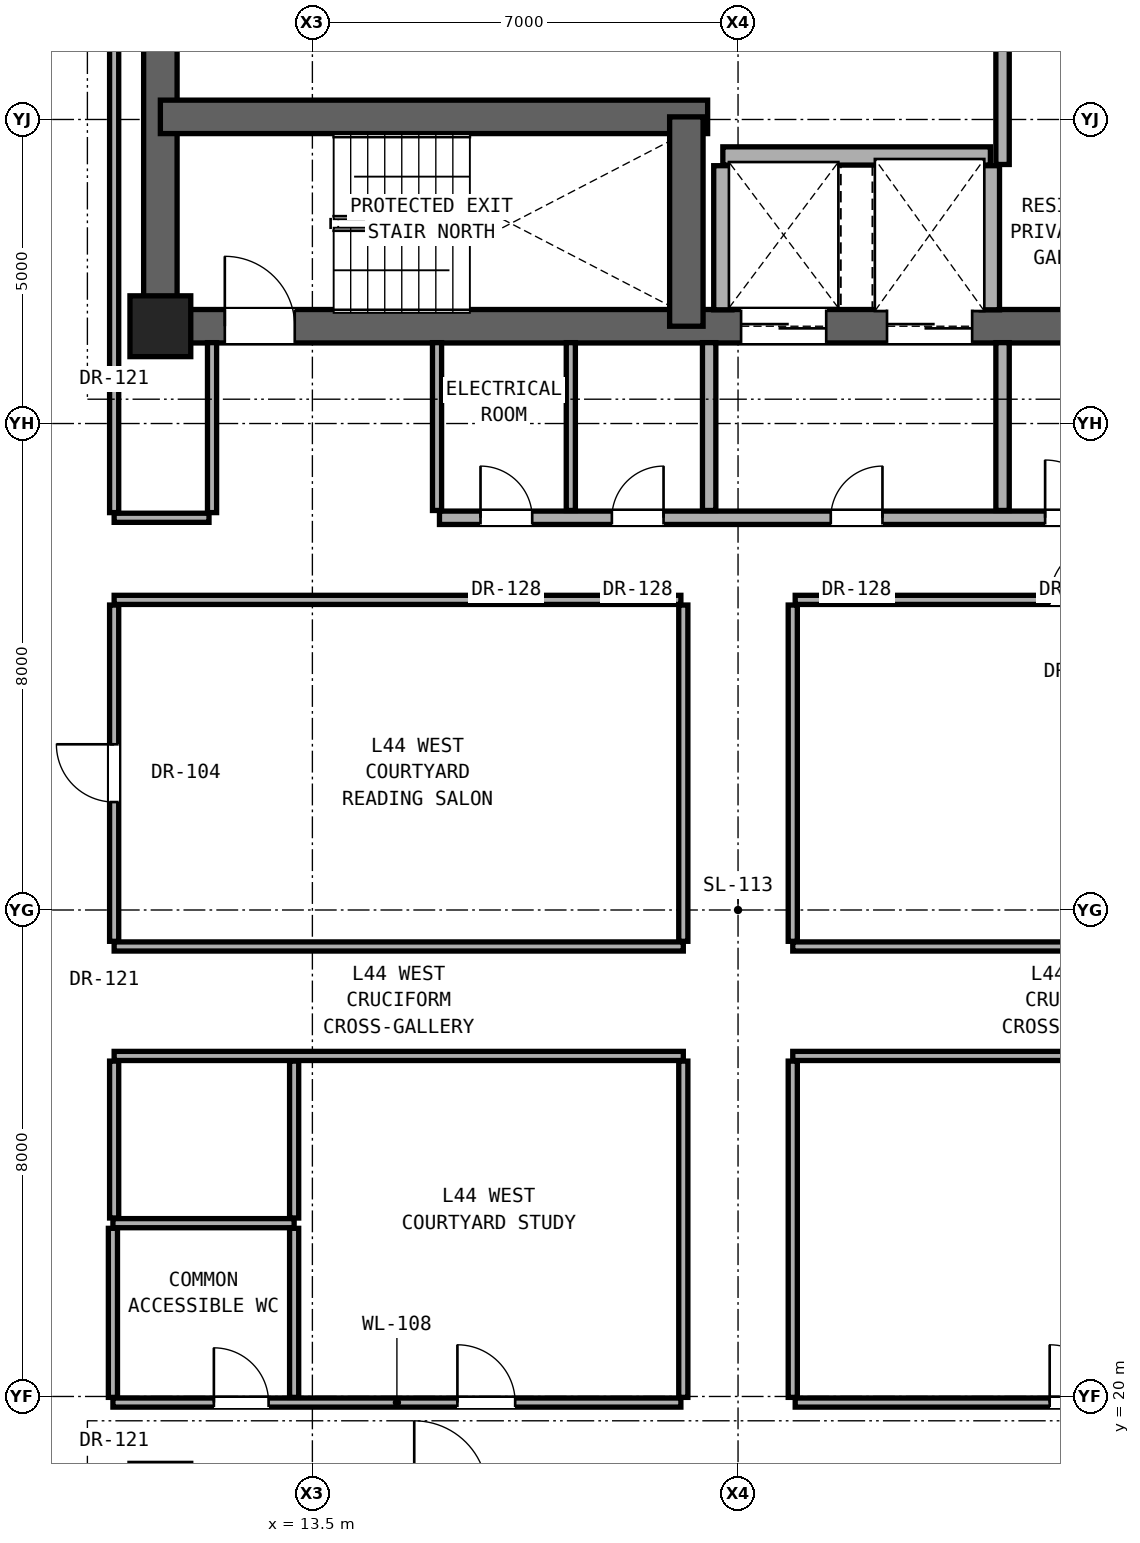
"""IFC4 building model, lengths in metres.
Left out: names, types, materials, properties, quantities, classifications, styles, units other than length and angle.
Written with IfcOpenShell. Run it as: python <this file> out.ifc"""

import sys

from ifc_helpers import new_model, si_unit, direction, frame, frame_2d, origin, origin_2d, place, context, subcontext, project, spatial, rectangle, extrude, element, fill, save


model = new_model("IFC4")
c1 = context("Model", 3, precision=1e-05, world=origin(), true_north=direction((0.0, 1.0)))
c2 = subcontext(c1, "Body", "Model", "MODEL_VIEW")
j1 = project(units=[si_unit("LENGTHUNIT", "METRE"), si_unit("PLANEANGLEUNIT", "RADIAN")], contexts=[c1])
p1 = place(None, origin())
s1 = spatial("IfcSite", under=j1, at=p1, CompositionType="ELEMENT")
p2 = place(p1, origin())
s2 = spatial("IfcBuilding", under=s1, at=p2, CompositionType="ELEMENT")
p3 = place(p2, frame((0.0, 0.0, 157.65)))
s3 = spatial("IfcBuildingStorey", under=s2, at=p3, CompositionType="ELEMENT", Elevation=157.65)
p4 = place(p3, frame((11.0, 37.6, 0.0), z_axis=(0.0, 0.0, 1.0), x_axis=(1.0, 0.0, 0.0)))
e1 = element("IfcColumn", 1, at=p4, inside=s3, PredefinedType="COLUMN", context=c2, shape_type="SweptSolid", body=[
    extrude(rectangle(XDim=1.0, YDim=1.0, at=origin_2d()), origin(), (0.0, 0.0, 1.0), 3.25),
])
p5 = place(p3, frame((11.0, 37.6, 0.0), z_axis=(0.0, 0.0, 1.0), x_axis=(0.0, 1.0, 0.0)))
e2 = element("IfcWall", 2, at=p5, inside=s3, PredefinedType="SHEAR", context=c2, shape_type="SweptSolid", body=[
    extrude(rectangle(XDim=6.0, YDim=0.55, at=frame_2d((3.0, 0.0))), origin(), (0.0, 0.0, 1.0), 3.05),
])
p6 = place(p3, frame((11.0, 37.6, 0.0), z_axis=(0.0, 0.0, 1.0), x_axis=(1.0, 0.0, 0.0)))
e3 = element("IfcWall", 3, at=p6, inside=s3, PredefinedType="SHEAR", context=c2, shape_type="SweptSolid", body=[
    extrude(rectangle(XDim=19.0, YDim=0.55, at=frame_2d((9.5, 0.0))), origin(), (0.0, 0.0, 1.0), 3.05),
])
p7 = place(p6, frame((1.06, 0.0, 0.0)))
e4 = element("IfcOpeningElement", 4, at=p7, cuts=e3, PredefinedType="OPENING", context=c2, shape_type="SweptSolid", body=[
    extrude(rectangle(XDim=1.15, YDim=2.2, at=frame_2d((0.575, 1.1))), frame((0.0, 0.285, 0.0), z_axis=(0.0, -1.0, 0.0), x_axis=(1.0, 0.0, 0.0)), (0.0, 0.0, 1.0), 0.57),
])
p8 = place(p6, frame((9.55, 0.0, 0.0)))
e5 = element("IfcOpeningElement", 5, at=p8, cuts=e3, PredefinedType="OPENING", context=c2, shape_type="SweptSolid", body=[
    extrude(rectangle(XDim=1.4, YDim=2.35, at=frame_2d((0.7, 1.175))), frame((0.0, 0.285, 0.0), z_axis=(0.0, -1.0, 0.0), x_axis=(1.0, 0.0, 0.0)), (0.0, 0.0, 1.0), 0.57),
])
p9 = place(p6, frame((11.95, 0.0, 0.0)))
e6 = element("IfcOpeningElement", 6, at=p9, cuts=e3, PredefinedType="OPENING", context=c2, shape_type="SweptSolid", body=[
    extrude(rectangle(XDim=1.4, YDim=2.35, at=frame_2d((0.7, 1.175))), frame((0.0, 0.285, 0.0), z_axis=(0.0, -1.0, 0.0), x_axis=(1.0, 0.0, 0.0)), (0.0, 0.0, 1.0), 0.57),
])
p10 = place(p3, frame((11.0, 41.043, 0.0), z_axis=(0.0, 0.0, 1.0), x_axis=(1.0, 0.0, 0.0)))
e7 = element("IfcWall", 7, at=p10, inside=s3, PredefinedType="SHEAR", context=c2, shape_type="SweptSolid", body=[
    extrude(rectangle(XDim=9.0, YDim=0.55, at=frame_2d((4.5, 0.0))), origin(), (0.0, 0.0, 1.0), 3.05),
])
p11 = place(p3, frame((19.65, 37.6, 0.0), z_axis=(0.0, 0.0, 1.0), x_axis=(0.0, 1.0, 0.0)))
e8 = element("IfcWall", 8, at=p11, inside=s3, PredefinedType="SHEAR", context=c2, shape_type="SweptSolid", body=[
    extrude(rectangle(XDim=3.443, YDim=0.55, at=frame_2d((1.721, 0.0))), origin(), (0.0, 0.0, 1.0), 3.05),
])
p12 = place(p3, frame((10.22, 19.9, 0.0), z_axis=(0.0, 0.0, 1.0), x_axis=(1.0, 0.0, 0.0)))
e9 = element("IfcWall", 9, at=p12, inside=s3, PredefinedType="PARTITIONING", context=c2, shape_type="SweptSolid", body=[
    extrude(rectangle(XDim=9.34, YDim=0.15, at=frame_2d((4.67, 0.0))), origin(), (0.0, 0.0, 1.0), 2.186),
])
p13 = place(p12, frame((1.66, 0.0, 0.0)))
e10 = element("IfcOpeningElement", 10, at=p13, cuts=e9, PredefinedType="OPENING", context=c2, shape_type="SweptSolid", body=[
    extrude(rectangle(XDim=0.9, YDim=2.1, at=frame_2d((0.45, 1.05))), frame((0.0, 0.085, 0.0), z_axis=(0.0, -1.0, 0.0), x_axis=(1.0, 0.0, 0.0)), (0.0, 0.0, 1.0), 0.17),
])
p14 = place(p12, frame((5.665, 0.0, 0.0)))
e11 = element("IfcOpeningElement", 11, at=p14, cuts=e9, PredefinedType="OPENING", context=c2, shape_type="SweptSolid", body=[
    extrude(rectangle(XDim=0.95, YDim=2.15, at=frame_2d((0.475, 1.075))), frame((0.0, 0.085, 0.0), z_axis=(0.0, -1.0, 0.0), x_axis=(1.0, 0.0, 0.0)), (0.0, 0.0, 1.0), 0.17),
])
p15 = place(p3, frame((21.44, 19.9, 0.0), z_axis=(0.0, 0.0, 1.0), x_axis=(1.0, 0.0, 0.0)))
e12 = element("IfcWall", 12, at=p15, inside=s3, PredefinedType="PARTITIONING", context=c2, shape_type="SweptSolid", body=[
    extrude(rectangle(XDim=9.32, YDim=0.15, at=frame_2d((4.66, 0.0))), origin(), (0.0, 0.0, 1.0), 2.186),
])
p16 = place(p15, frame((4.185, 0.0, 0.0)))
e13 = element("IfcOpeningElement", 13, at=p16, cuts=e12, PredefinedType="OPENING", context=c2, shape_type="SweptSolid", body=[
    extrude(rectangle(XDim=0.95, YDim=2.15, at=frame_2d((0.475, 1.075))), frame((0.0, 0.085, 0.0), z_axis=(0.0, -1.0, 0.0), x_axis=(1.0, 0.0, 0.0)), (0.0, 0.0, 1.0), 0.17),
])
p17 = place(p3, frame((10.22, 22.85, 0.0), z_axis=(0.0, 0.0, 1.0), x_axis=(1.0, 0.0, 0.0)))
e14 = element("IfcWall", 14, at=p17, inside=s3, PredefinedType="PARTITIONING", context=c2, shape_type="SweptSolid", body=[
    extrude(rectangle(XDim=2.98, YDim=0.15, at=frame_2d((1.49, 0.0))), origin(), (0.0, 0.0, 1.0), 2.186),
])
for number, where, z_axis, x_axis in (
    (15, (10.24, 25.6, 0.0), (0.0, 0.0, 1.0), (1.0, 0.0, 0.0)),
    (16, (21.4, 25.6, 0.0), (0.0, 0.0, 1.0), (1.0, 0.0, 0.0)),
    (17, (10.24, 27.4, 0.0), (0.0, 0.0, 1.0), (1.0, 0.0, 0.0)),
    (18, (21.4, 27.4, 0.0), (0.0, 0.0, 1.0), (1.0, 0.0, 0.0)),
):
    element("IfcWall", number, at=place(p3, frame(where, z_axis=z_axis, x_axis=x_axis)), inside=s3, PredefinedType="PARTITIONING", context=c2, shape_type="SweptSolid", body=[
        extrude(rectangle(XDim=9.36, YDim=0.15, at=frame_2d((4.68, 0.0))), origin(), (0.0, 0.0, 1.0), 2.186),
    ])
p18 = place(p3, frame((10.24, 33.1, 0.0), z_axis=(0.0, 0.0, 1.0), x_axis=(1.0, 0.0, 0.0)))
e19 = element("IfcWall", 19, at=p18, inside=s3, PredefinedType="PARTITIONING", context=c2, shape_type="SweptSolid", body=[
    extrude(rectangle(XDim=9.32, YDim=0.15, at=frame_2d((4.66, 0.0))), origin(), (0.0, 0.0, 1.0), 2.186),
])
p19 = place(p3, frame((21.44, 33.1, 0.0), z_axis=(0.0, 0.0, 1.0), x_axis=(1.0, 0.0, 0.0)))
e20 = element("IfcWall", 20, at=p19, inside=s3, PredefinedType="PARTITIONING", context=c2, shape_type="SweptSolid", body=[
    extrude(rectangle(XDim=9.32, YDim=0.15, at=frame_2d((4.66, 0.0))), origin(), (0.0, 0.0, 1.0), 2.186),
])
p20 = place(p19, frame((4.185, 0.0, 0.0)))
e21 = element("IfcOpeningElement", 21, at=p20, cuts=e20, PredefinedType="OPENING", context=c2, shape_type="SweptSolid", body=[
    extrude(rectangle(XDim=0.95, YDim=2.15, at=frame_2d((0.475, 1.075))), frame((0.0, 0.085, 0.0), z_axis=(0.0, -1.0, 0.0), x_axis=(1.0, 0.0, 0.0)), (0.0, 0.0, 1.0), 0.17),
])
p21 = place(p3, frame((10.24, 34.45, 0.0), z_axis=(0.0, 0.0, 1.0), x_axis=(1.0, 0.0, 0.0)))
e22 = element("IfcWall", 22, at=p21, inside=s3, PredefinedType="PARTITIONING", context=c2, shape_type="SweptSolid", body=[
    extrude(rectangle(XDim=1.56, YDim=0.15, at=frame_2d((0.78, 0.0))), origin(), (0.0, 0.0, 1.0), 2.186),
])
p22 = place(p3, frame((15.59, 34.45, 0.0), z_axis=(0.0, 0.0, 1.0), x_axis=(1.0, 0.0, 0.0)))
e23 = element("IfcWall", 23, at=p22, inside=s3, PredefinedType="SOLIDWALL", context=c2, shape_type="SweptSolid", body=[
    extrude(rectangle(XDim=15.17, YDim=0.22, at=frame_2d((7.585, 0.0))), origin(), (0.0, 0.0, 1.0), 2.186),
])
p23 = place(p22, frame((6.435, 0.0, 0.0)))
e24 = element("IfcOpeningElement", 24, at=p23, cuts=e23, PredefinedType="OPENING", context=c2, shape_type="SweptSolid", body=[
    extrude(rectangle(XDim=0.85, YDim=2.01, at=frame_2d((0.425, 1.005))), frame((0.0, 0.12, 0.0), z_axis=(0.0, -1.0, 0.0), x_axis=(1.0, 0.0, 0.0)), (0.0, 0.0, 1.0), 0.24),
])
p24 = place(p22, frame((9.96, 0.0, 0.0)))
e25 = element("IfcOpeningElement", 25, at=p24, cuts=e23, PredefinedType="OPENING", context=c2, shape_type="SweptSolid", body=[
    extrude(rectangle(XDim=0.95, YDim=2.15, at=frame_2d((0.475, 1.075))), frame((0.0, 0.12, 0.0), z_axis=(0.0, -1.0, 0.0), x_axis=(1.0, 0.0, 0.0)), (0.0, 0.0, 1.0), 0.24),
])
p25 = place(p22, frame((12.21, 0.0, 0.0)))
e26 = element("IfcOpeningElement", 26, at=p25, cuts=e23, PredefinedType="OPENING", context=c2, shape_type="SweptSolid", body=[
    extrude(rectangle(XDim=0.95, YDim=2.15, at=frame_2d((0.475, 1.075))), frame((0.0, 0.12, 0.0), z_axis=(0.0, -1.0, 0.0), x_axis=(1.0, 0.0, 0.0)), (0.0, 0.0, 1.0), 0.24),
])
p26 = place(p22, frame((0.675, 0.0, 0.0)))
e27 = element("IfcOpeningElement", 27, at=p26, cuts=e23, PredefinedType="OPENING", context=c2, shape_type="SweptSolid", body=[
    extrude(rectangle(XDim=0.85, YDim=2.01, at=frame_2d((0.425, 1.005))), frame((0.0, 0.12, 0.0), z_axis=(0.0, -1.0, 0.0), x_axis=(1.0, 0.0, 0.0)), (0.0, 0.0, 1.0), 0.24),
])
p27 = place(p22, frame((2.835, 0.0, 0.0)))
e28 = element("IfcOpeningElement", 28, at=p27, cuts=e23, PredefinedType="OPENING", context=c2, shape_type="SweptSolid", body=[
    extrude(rectangle(XDim=0.85, YDim=2.01, at=frame_2d((0.425, 1.005))), frame((0.0, 0.12, 0.0), z_axis=(0.0, -1.0, 0.0), x_axis=(1.0, 0.0, 0.0)), (0.0, 0.0, 1.0), 0.24),
])
p28 = place(p3, frame((20.25, 40.4, 0.0), z_axis=(0.0, 0.0, 1.0), x_axis=(1.0, 0.0, 0.0)))
e29 = element("IfcWall", 29, at=p28, inside=s3, PredefinedType="SOLIDWALL", context=c2, shape_type="SweptSolid", body=[
    extrude(rectangle(XDim=4.4, YDim=0.3, at=frame_2d((2.2, 0.0))), origin(), (0.0, 0.0, 1.0), 3.05),
])
p29 = place(p3, frame((10.22, 19.985, 0.0), z_axis=(0.0, 0.0, 1.0), x_axis=(0.0, 1.0, 0.0)))
e30 = element("IfcWall", 30, at=p29, inside=s3, PredefinedType="PARTITIONING", context=c2, shape_type="SweptSolid", body=[
    extrude(rectangle(XDim=2.78, YDim=0.15, at=frame_2d((1.39, 0.0))), origin(), (0.0, 0.0, 1.0), 3.05),
])
p30 = place(p3, frame((10.24, 22.935, 0.0), z_axis=(0.0, 0.0, 1.0), x_axis=(0.0, 1.0, 0.0)))
e31 = element("IfcWall", 31, at=p30, inside=s3, PredefinedType="PARTITIONING", context=c2, shape_type="SweptSolid", body=[
    extrude(rectangle(XDim=2.58, YDim=0.15, at=frame_2d((1.29, 0.0))), origin(), (0.0, 0.0, 1.0), 2.346),
])
p31 = place(p3, frame((10.24, 27.485, 0.0), z_axis=(0.0, 0.0, 1.0), x_axis=(0.0, 1.0, 0.0)))
e32 = element("IfcWall", 32, at=p31, inside=s3, PredefinedType="PARTITIONING", context=c2, shape_type="SweptSolid", body=[
    extrude(rectangle(XDim=5.53, YDim=0.15, at=frame_2d((2.765, 0.0))), origin(), (0.0, 0.0, 1.0), 2.346),
])
p32 = place(p31, frame((2.29, 0.0, 0.0)))
e33 = element("IfcOpeningElement", 33, at=p32, cuts=e32, PredefinedType="OPENING", context=c2, shape_type="SweptSolid", body=[
    extrude(rectangle(XDim=0.95, YDim=2.15, at=frame_2d((0.475, 1.075))), frame((0.0, 0.085, 0.0), z_axis=(0.0, -1.0, 0.0), x_axis=(1.0, 0.0, 0.0)), (0.0, 0.0, 1.0), 0.17),
])
p33 = place(p3, frame((10.24, 34.535, 0.0), z_axis=(0.0, 0.0, 1.0), x_axis=(0.0, 1.0, 0.0)))
e34 = element("IfcWall", 34, at=p33, inside=s3, PredefinedType="PARTITIONING", context=c2, shape_type="SweptSolid", body=[
    extrude(rectangle(XDim=9.13, YDim=0.15, at=frame_2d((4.565, 0.0))), origin(), (0.0, 0.0, 1.0), 2.442),
])
p34 = place(p3, frame((11.85, 34.535, 0.0), z_axis=(0.0, 0.0, 1.0), x_axis=(0.0, 1.0, 0.0)))
e35 = element("IfcWall", 35, at=p34, inside=s3, PredefinedType="PARTITIONING", context=c2, shape_type="SweptSolid", body=[
    extrude(rectangle(XDim=2.795, YDim=0.15, at=frame_2d((1.397, 0.0))), origin(), (0.0, 0.0, 1.0), 3.05),
])
p35 = place(p3, frame((13.2, 19.985, 0.0), z_axis=(0.0, 0.0, 1.0), x_axis=(0.0, 1.0, 0.0)))
e36 = element("IfcWall", 36, at=p35, inside=s3, PredefinedType="PARTITIONING", context=c2, shape_type="SweptSolid", body=[
    extrude(rectangle(XDim=2.78, YDim=0.15, at=frame_2d((1.39, 0.0))), origin(), (0.0, 0.0, 1.0), 3.05),
])
p36 = place(p3, frame((13.2, 22.935, 0.0), z_axis=(0.0, 0.0, 1.0), x_axis=(0.0, 1.0, 0.0)))
e37 = element("IfcWall", 37, at=p36, inside=s3, PredefinedType="PARTITIONING", context=c2, shape_type="SweptSolid", body=[
    extrude(rectangle(XDim=2.58, YDim=0.15, at=frame_2d((1.29, 0.0))), origin(), (0.0, 0.0, 1.0), 2.186),
])
for number, where, z_axis, x_axis in (
    (38, (15.55, 34.57, 0.0), (0.0, 0.0, 1.0), (0.0, 1.0, 0.0)),
    (39, (17.75, 34.57, 0.0), (0.0, 0.0, 1.0), (0.0, 1.0, 0.0)),
):
    element("IfcWall", number, at=place(p3, frame(where, z_axis=z_axis, x_axis=x_axis)), inside=s3, PredefinedType="PARTITIONING", context=c2, shape_type="SweptSolid", body=[
        extrude(rectangle(XDim=2.76, YDim=0.15, at=frame_2d((1.38, 0.0))), origin(), (0.0, 0.0, 1.0), 3.05),
    ])
for number, where, z_axis, x_axis in (
    (40, (19.6, 19.985, 0.0), (0.0, 0.0, 1.0), (0.0, 1.0, 0.0)),
    (41, (19.6, 27.485, 0.0), (0.0, 0.0, 1.0), (0.0, 1.0, 0.0)),
):
    element("IfcWall", number, at=place(p3, frame(where, z_axis=z_axis, x_axis=x_axis)), inside=s3, PredefinedType="PARTITIONING", context=c2, shape_type="SweptSolid", body=[
        extrude(rectangle(XDim=5.53, YDim=0.15, at=frame_2d((2.765, 0.0))), origin(), (0.0, 0.0, 1.0), 2.186),
    ])
p37 = place(p3, frame((20.025, 34.57, 0.0), z_axis=(0.0, 0.0, 1.0), x_axis=(0.0, 1.0, 0.0)))
e42 = element("IfcWall", 42, at=p37, inside=s3, PredefinedType="SOLIDWALL", context=c2, shape_type="SweptSolid", body=[
    extrude(rectangle(XDim=2.76, YDim=0.22, at=frame_2d((1.38, 0.0))), origin(), (0.0, 0.0, 1.0), 3.05),
])
p38 = place(p3, frame((20.25, 37.87, 0.0), z_axis=(0.0, 0.0, 1.0), x_axis=(0.0, 1.0, 0.0)))
e43 = element("IfcWall", 43, at=p38, inside=s3, PredefinedType="SOLIDWALL", context=c2, shape_type="SweptSolid", body=[
    extrude(rectangle(XDim=2.37, YDim=0.3, at=frame_2d((1.185, 0.0))), origin(), (0.0, 0.0, 1.0), 3.05),
])
for number, where, z_axis, x_axis in (
    (44, (21.4, 19.985, 0.0), (0.0, 0.0, 1.0), (0.0, 1.0, 0.0)),
    (45, (21.4, 27.485, 0.0), (0.0, 0.0, 1.0), (0.0, 1.0, 0.0)),
):
    element("IfcWall", number, at=place(p3, frame(where, z_axis=z_axis, x_axis=x_axis)), inside=s3, PredefinedType="PARTITIONING", context=c2, shape_type="SweptSolid", body=[
        extrude(rectangle(XDim=5.53, YDim=0.15, at=frame_2d((2.765, 0.0))), origin(), (0.0, 0.0, 1.0), 2.186),
    ])
p39 = place(p3, frame((24.65, 37.87, 0.0), z_axis=(0.0, 0.0, 1.0), x_axis=(0.0, 1.0, 0.0)))
e46 = element("IfcWall", 46, at=p39, inside=s3, PredefinedType="SOLIDWALL", context=c2, shape_type="SweptSolid", body=[
    extrude(rectangle(XDim=2.37, YDim=0.3, at=frame_2d((1.185, 0.0))), origin(), (0.0, 0.0, 1.0), 3.05),
])
p40 = place(p3, frame((24.85, 34.57, 0.0), z_axis=(0.0, 0.0, 1.0), x_axis=(0.0, 1.0, 0.0)))
e47 = element("IfcWall", 47, at=p40, inside=s3, PredefinedType="SOLIDWALL", context=c2, shape_type="SweptSolid", body=[
    extrude(rectangle(XDim=2.76, YDim=0.22, at=frame_2d((1.38, 0.0))), origin(), (0.0, 0.0, 1.0), 3.05),
])
p41 = place(p3, frame((24.85, 40.26, 0.0), z_axis=(0.0, 0.0, 1.0), x_axis=(0.0, 1.0, 0.0)))
e48 = element("IfcWall", 48, at=p41, inside=s3, PredefinedType="SOLIDWALL", context=c2, shape_type="SweptSolid", body=[
    extrude(rectangle(XDim=2.94, YDim=0.22, at=frame_2d((1.47, 0.0))), origin(), (0.0, 0.0, 1.0), 3.05),
])
p42 = place(p7, origin())
e49 = element("IfcDoor", 49, at=p42, inside=s3, OperationType="SINGLE_SWING_LEFT", PredefinedType="DOOR", context=c2, shape_type="SweptSolid", body=[
    extrude(rectangle(XDim=1.15, YDim=2.2, at=frame_2d((0.575, 1.1))), frame((0.0, 0.025, 0.0), z_axis=(0.0, -1.0, 0.0), x_axis=(1.0, 0.0, 0.0)), (0.0, 0.0, 1.0), 0.05),
])
fill(e4, e49)
p43 = place(p23, origin())
e50 = element("IfcDoor", 50, at=p43, inside=s3, OperationType="SINGLE_SWING_RIGHT", PredefinedType="DOOR", context=c2, shape_type="SweptSolid", body=[
    extrude(rectangle(XDim=0.85, YDim=2.01, at=frame_2d((0.425, 1.005))), frame((0.0, 0.025, 0.0), z_axis=(0.0, -1.0, 0.0), x_axis=(1.0, 0.0, 0.0)), (0.0, 0.0, 1.0), 0.05),
])
fill(e24, e50)
p44 = place(p24, origin())
e51 = element("IfcDoor", 51, at=p44, inside=s3, OperationType="SINGLE_SWING_LEFT", PredefinedType="DOOR", context=c2, shape_type="SweptSolid", body=[
    extrude(rectangle(XDim=0.95, YDim=2.15, at=frame_2d((0.475, 1.075))), frame((0.0, 0.025, 0.0), z_axis=(0.0, -1.0, 0.0), x_axis=(1.0, 0.0, 0.0)), (0.0, 0.0, 1.0), 0.05),
])
fill(e25, e51)
p45 = place(p26, origin())
e52 = element("IfcDoor", 52, at=p45, inside=s3, OperationType="SINGLE_SWING_LEFT", PredefinedType="DOOR", context=c2, shape_type="SweptSolid", body=[
    extrude(rectangle(XDim=0.85, YDim=2.01, at=frame_2d((0.425, 1.005))), frame((0.0, 0.025, 0.0), z_axis=(0.0, -1.0, 0.0), x_axis=(1.0, 0.0, 0.0)), (0.0, 0.0, 1.0), 0.05),
])
fill(e27, e52)
p46 = place(p27, origin())
e53 = element("IfcDoor", 53, at=p46, inside=s3, OperationType="SINGLE_SWING_RIGHT", PredefinedType="DOOR", context=c2, shape_type="SweptSolid", body=[
    extrude(rectangle(XDim=0.85, YDim=2.01, at=frame_2d((0.425, 1.005))), frame((0.0, 0.025, 0.0), z_axis=(0.0, -1.0, 0.0), x_axis=(1.0, 0.0, 0.0)), (0.0, 0.0, 1.0), 0.05),
])
fill(e28, e53)
p47 = place(p13, origin())
e54 = element("IfcDoor", 54, at=p47, inside=s3, OperationType="SINGLE_SWING_LEFT", PredefinedType="DOOR", context=c2, shape_type="SweptSolid", body=[
    extrude(rectangle(XDim=0.9, YDim=2.1, at=frame_2d((0.45, 1.05))), frame((0.0, 0.025, 0.0), z_axis=(0.0, -1.0, 0.0), x_axis=(1.0, 0.0, 0.0)), (0.0, 0.0, 1.0), 0.05),
])
fill(e10, e54)
p48 = place(p14, origin())
e55 = element("IfcDoor", 55, at=p48, inside=s3, OperationType="SINGLE_SWING_LEFT", PredefinedType="DOOR", context=c2, shape_type="SweptSolid", body=[
    extrude(rectangle(XDim=0.95, YDim=2.15, at=frame_2d((0.475, 1.075))), frame((0.0, 0.025, 0.0), z_axis=(0.0, -1.0, 0.0), x_axis=(1.0, 0.0, 0.0)), (0.0, 0.0, 1.0), 0.05),
])
fill(e11, e55)
p49 = place(p32, origin())
e56 = element("IfcDoor", 56, at=p49, inside=s3, OperationType="SINGLE_SWING_RIGHT", PredefinedType="DOOR", context=c2, shape_type="SweptSolid", body=[
    extrude(rectangle(XDim=0.95, YDim=2.15, at=frame_2d((0.475, 1.075))), frame((0.0, 0.025, 0.0), z_axis=(0.0, -1.0, 0.0), x_axis=(1.0, 0.0, 0.0)), (0.0, 0.0, 1.0), 0.05),
])
fill(e33, e56)
p50 = place(p16, origin())
e57 = element("IfcDoor", 57, at=p50, inside=s3, OperationType="SINGLE_SWING_LEFT", PredefinedType="DOOR", context=c2, shape_type="SweptSolid", body=[
    extrude(rectangle(XDim=0.95, YDim=2.15, at=frame_2d((0.475, 1.075))), frame((0.0, 0.025, 0.0), z_axis=(0.0, -1.0, 0.0), x_axis=(1.0, 0.0, 0.0)), (0.0, 0.0, 1.0), 0.05),
])
fill(e13, e57)
p51 = place(p20, origin())
e58 = element("IfcDoor", 58, at=p51, inside=s3, OperationType="SINGLE_SWING_RIGHT", PredefinedType="DOOR", context=c2, shape_type="SweptSolid", body=[
    extrude(rectangle(XDim=0.95, YDim=2.15, at=frame_2d((0.475, 1.075))), frame((0.0, 0.025, 0.0), z_axis=(0.0, -1.0, 0.0), x_axis=(1.0, 0.0, 0.0)), (0.0, 0.0, 1.0), 0.05),
])
fill(e21, e58)
p52 = place(p8, origin())
e59 = element("IfcDoor", 59, at=p52, inside=s3, OperationType="DOUBLE_DOOR_SLIDING", PredefinedType="DOOR", context=c2, shape_type="SweptSolid", body=[
    extrude(rectangle(XDim=1.4, YDim=2.35, at=frame_2d((0.7, 1.175))), frame((0.0, 0.025, 0.0), z_axis=(0.0, -1.0, 0.0), x_axis=(1.0, 0.0, 0.0)), (0.0, 0.0, 1.0), 0.05),
])
fill(e5, e59)
p53 = place(p9, origin())
e60 = element("IfcDoor", 60, at=p53, inside=s3, OperationType="DOUBLE_DOOR_SLIDING", PredefinedType="DOOR", context=c2, shape_type="SweptSolid", body=[
    extrude(rectangle(XDim=1.4, YDim=2.35, at=frame_2d((0.7, 1.175))), frame((0.0, 0.025, 0.0), z_axis=(0.0, -1.0, 0.0), x_axis=(1.0, 0.0, 0.0)), (0.0, 0.0, 1.0), 0.05),
])
fill(e6, e60)
save(model, sys.argv[1])
